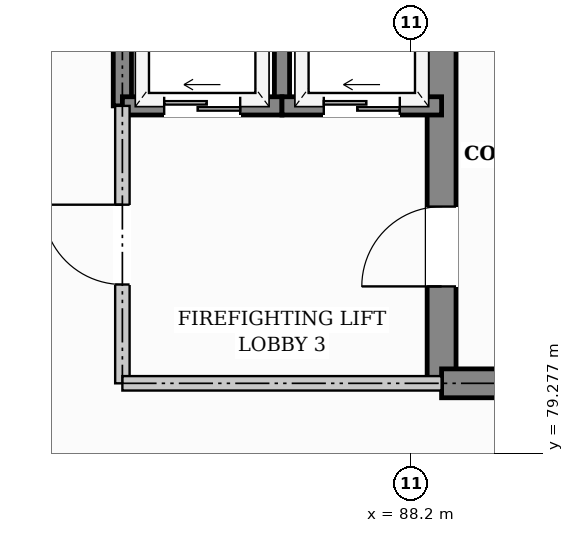
"""IFC4 building model, lengths in metres.
Left out: names, types, materials, properties, quantities, classifications, styles, units other than length and angle.
Written with IfcOpenShell. Run it as: python <this file> out.ifc"""

import sys

from ifc_helpers import new_model, si_unit, direction, frame, frame_2d, origin, place, context, subcontext, project, spatial, rectangle, extrude, element, fill, save


model = new_model("IFC4")
c1 = context("Model", 3, precision=1e-05, world=origin(), true_north=direction((0.0, 1.0)))
c2 = subcontext(c1, "Body", "Model", "MODEL_VIEW")
j1 = project(units=[si_unit("LENGTHUNIT", "METRE"), si_unit("PLANEANGLEUNIT", "RADIAN")], contexts=[c1])
p1 = place(None, origin())
s1 = spatial("IfcSite", under=j1, at=p1, CompositionType="ELEMENT")
p2 = place(p1, origin())
s2 = spatial("IfcBuilding", under=s1, at=p2, CompositionType="ELEMENT")
p3 = place(p2, frame((0.0, 0.0, 13.2)))
s3 = spatial("IfcBuildingStorey", under=s2, at=p3, CompositionType="ELEMENT", Elevation=13.2)
p4 = place(p3, frame((88.6, 80.2, 0.0), z_axis=(0.0, 0.0, 1.0), x_axis=(0.0, 1.0, 0.0)))
e1 = element("IfcWall", 1, at=p4, inside=s3, PredefinedType="SHEAR", context=c2, shape_type="SweptSolid", body=[
    extrude(rectangle(XDim=6.0, YDim=0.38, at=frame_2d((3.0, 0.0))), origin(), (0.0, 0.0, 1.0), 3.3),
])
p5 = place(p4, frame((1.275, 0.0, 0.0)))
e2 = element("IfcOpeningElement", 2, at=p5, cuts=e1, PredefinedType="OPENING", context=c2, shape_type="SweptSolid", body=[
    extrude(rectangle(XDim=1.05, YDim=2.15, at=frame_2d((0.525, 1.075))), frame((0.0, 0.2, 0.0), z_axis=(0.0, -1.0, 0.0), x_axis=(1.0, 0.0, 0.0)), (0.0, 0.0, 1.0), 0.4),
])
p6 = place(p3, frame((88.6, 80.2, 0.0), z_axis=(0.0, 0.0, 1.0), x_axis=(1.0, 0.0, 0.0)))
e3 = element("IfcWall", 3, at=p6, inside=s3, PredefinedType="SHEAR", context=c2, shape_type="SweptSolid", body=[
    extrude(rectangle(XDim=7.0, YDim=0.38, at=frame_2d((3.5, 0.0))), origin(), (0.0, 0.0, 1.0), 3.3),
])
p7 = place(p3, frame((84.4, 83.85, 0.0), z_axis=(0.0, 0.0, 1.0), x_axis=(0.0, 1.0, 0.0)))
e4 = element("IfcWall", 4, at=p7, inside=s3, PredefinedType="SHEAR", context=c2, shape_type="SweptSolid", body=[
    extrude(rectangle(XDim=2.35, YDim=0.24, at=frame_2d((1.175, 0.0))), origin(), (0.0, 0.0, 1.0), 3.3),
])
p8 = place(p3, frame((86.5, 83.85, 0.0), z_axis=(0.0, 0.0, 1.0), x_axis=(0.0, 1.0, 0.0)))
e5 = element("IfcWall", 5, at=p8, inside=s3, PredefinedType="SHEAR", context=c2, shape_type="SweptSolid", body=[
    extrude(rectangle(XDim=2.35, YDim=0.2, at=frame_2d((1.175, 0.0))), origin(), (0.0, 0.0, 1.0), 3.3),
])
p9 = place(p3, frame((84.4, 83.85, 0.0), z_axis=(0.0, 0.0, 1.0), x_axis=(1.0, 0.0, 0.0)))
e6 = element("IfcWall", 6, at=p9, inside=s3, PredefinedType="SHEAR", context=c2, shape_type="SweptSolid", body=[
    extrude(rectangle(XDim=2.1, YDim=0.24, at=frame_2d((1.05, 0.0))), origin(), (0.0, 0.0, 1.0), 3.3),
])
p10 = place(p9, frame((0.55, 0.0, 0.0)))
e7 = element("IfcOpeningElement", 7, at=p10, cuts=e6, PredefinedType="OPENING", context=c2, shape_type="SweptSolid", body=[
    extrude(rectangle(XDim=1.0, YDim=2.1, at=frame_2d((0.5, 1.05))), frame((0.0, 0.13, 0.0), z_axis=(0.0, -1.0, 0.0), x_axis=(1.0, 0.0, 0.0)), (0.0, 0.0, 1.0), 0.26),
])
p11 = place(p3, frame((86.5, 83.85, 0.0), z_axis=(0.0, 0.0, 1.0), x_axis=(1.0, 0.0, 0.0)))
e8 = element("IfcWall", 8, at=p11, inside=s3, PredefinedType="SHEAR", context=c2, shape_type="SweptSolid", body=[
    extrude(rectangle(XDim=2.1, YDim=0.24, at=frame_2d((1.05, 0.0))), origin(), (0.0, 0.0, 1.0), 3.3),
])
p12 = place(p11, frame((0.55, 0.0, 0.0)))
e9 = element("IfcOpeningElement", 9, at=p12, cuts=e8, PredefinedType="OPENING", context=c2, shape_type="SweptSolid", body=[
    extrude(rectangle(XDim=1.0, YDim=2.1, at=frame_2d((0.5, 1.05))), frame((0.0, 0.13, 0.0), z_axis=(0.0, -1.0, 0.0), x_axis=(1.0, 0.0, 0.0)), (0.0, 0.0, 1.0), 0.26),
])
p13 = place(p3, frame((84.4, 80.2, 0.0), z_axis=(0.0, 0.0, 1.0), x_axis=(0.0, 1.0, 0.0)))
e10 = element("IfcWall", 10, at=p13, inside=s3, PredefinedType="PARTITIONING", context=c2, shape_type="SweptSolid", body=[
    extrude(rectangle(XDim=3.65, YDim=0.19, at=frame_2d((1.825, 0.0))), origin(), (0.0, 0.0, 1.0), 3.3),
])
p14 = place(p13, frame((1.3, 0.0, 0.0)))
e11 = element("IfcOpeningElement", 11, at=p14, cuts=e10, PredefinedType="OPENING", context=c2, shape_type="SweptSolid", body=[
    extrude(rectangle(XDim=1.05, YDim=2.15, at=frame_2d((0.525, 1.075))), frame((0.0, 0.105, 0.0), z_axis=(0.0, -1.0, 0.0), x_axis=(1.0, 0.0, 0.0)), (0.0, 0.0, 1.0), 0.21),
])
p15 = place(p3, frame((84.4, 80.2, 0.0), z_axis=(0.0, 0.0, 1.0), x_axis=(1.0, 0.0, 0.0)))
e12 = element("IfcWall", 12, at=p15, inside=s3, PredefinedType="PARTITIONING", context=c2, shape_type="SweptSolid", body=[
    extrude(rectangle(XDim=4.2, YDim=0.19, at=frame_2d((2.1, 0.0))), origin(), (0.0, 0.0, 1.0), 3.3),
])
p16 = place(p5, origin())
e13 = element("IfcDoor", 13, at=p16, inside=s3, OperationType="SINGLE_SWING_LEFT", PredefinedType="DOOR", context=c2, shape_type="SweptSolid", body=[
    extrude(rectangle(XDim=1.05, YDim=2.15, at=frame_2d((0.525, 1.075))), frame((0.0, 0.025, 0.0), z_axis=(0.0, -1.0, 0.0), x_axis=(1.0, 0.0, 0.0)), (0.0, 0.0, 1.0), 0.05),
])
fill(e2, e13)
p17 = place(p10, origin())
e14 = element("IfcDoor", 14, at=p17, inside=s3, OperationType="SLIDING_TO_LEFT", PredefinedType="DOOR", context=c2, shape_type="SweptSolid", body=[
    extrude(rectangle(XDim=1.0, YDim=2.1, at=frame_2d((0.5, 1.05))), frame((0.0, 0.025, 0.0), z_axis=(0.0, -1.0, 0.0), x_axis=(1.0, 0.0, 0.0)), (0.0, 0.0, 1.0), 0.05),
])
fill(e7, e14)
p18 = place(p12, origin())
e15 = element("IfcDoor", 15, at=p18, inside=s3, OperationType="SLIDING_TO_LEFT", PredefinedType="DOOR", context=c2, shape_type="SweptSolid", body=[
    extrude(rectangle(XDim=1.0, YDim=2.1, at=frame_2d((0.5, 1.05))), frame((0.0, 0.025, 0.0), z_axis=(0.0, -1.0, 0.0), x_axis=(1.0, 0.0, 0.0)), (0.0, 0.0, 1.0), 0.05),
])
fill(e9, e15)
p19 = place(p14, origin())
e16 = element("IfcDoor", 16, at=p19, inside=s3, OperationType="SINGLE_SWING_RIGHT", PredefinedType="DOOR", context=c2, shape_type="SweptSolid", body=[
    extrude(rectangle(XDim=1.05, YDim=2.15, at=frame_2d((0.525, 1.075))), frame((0.0, 0.025, 0.0), z_axis=(0.0, -1.0, 0.0), x_axis=(1.0, 0.0, 0.0)), (0.0, 0.0, 1.0), 0.05),
])
fill(e11, e16)
save(model, sys.argv[1])
